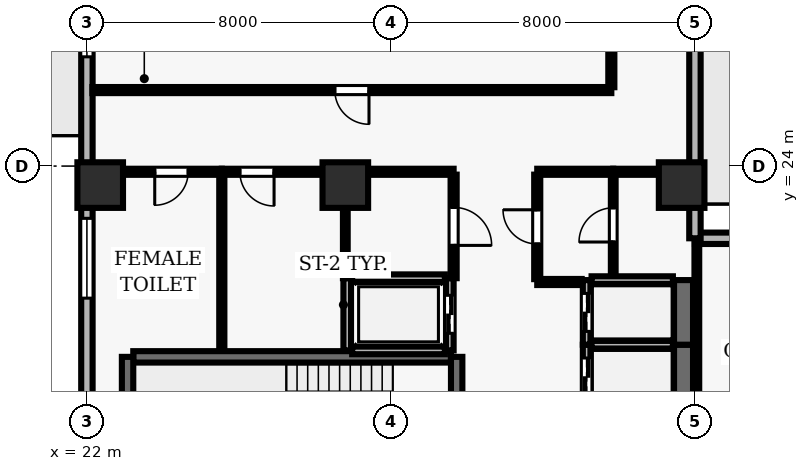
"""IFC4 building model, lengths in metres.
Left out: names, types, materials, properties, quantities, classifications, styles, units other than length and angle.
Written with IfcOpenShell. Run it as: python <this file> out.ifc"""

import sys

from ifc_helpers import new_model, si_unit, direction, frame, frame_2d, origin, origin_2d, place, context, subcontext, project, spatial, rectangle, extrude, element, fill, save


model = new_model("IFC4")
c1 = context("Model", 3, precision=1e-05, world=origin(), true_north=direction((0.0, 1.0)))
c2 = subcontext(c1, "Body", "Model", "MODEL_VIEW")
j1 = project(units=[si_unit("LENGTHUNIT", "METRE"), si_unit("PLANEANGLEUNIT", "RADIAN")], contexts=[c1])
p1 = place(None, origin())
s1 = spatial("IfcSite", under=j1, at=p1, CompositionType="ELEMENT")
p2 = place(p1, origin())
s2 = spatial("IfcBuilding", under=s1, at=p2, CompositionType="ELEMENT")
p3 = place(p2, frame((0.0, 0.0, 161.9)))
s3 = spatial("IfcBuildingStorey", under=s2, at=p3, CompositionType="ELEMENT", Elevation=161.9)
for number, where, z_axis, x_axis in (
    (1, (22.35, 23.5, 0.0), (0.0, 0.0, 1.0), (1.0, 0.0, 0.0)),
    (2, (28.8, 23.5, 0.0), (0.0, 0.0, 1.0), (1.0, 0.0, 0.0)),
    (3, (37.65, 23.5, 0.0), (0.0, 0.0, 1.0), (1.0, 0.0, 0.0)),
):
    element("IfcColumn", number, at=place(p3, frame(where, z_axis=z_axis, x_axis=x_axis)), inside=s3, PredefinedType="COLUMN", context=c2, shape_type="SweptSolid", body=[
        extrude(rectangle(XDim=1.2, YDim=1.2, at=origin_2d()), origin(), (0.0, 0.0, 1.0), 3.9),
    ])
p4 = place(p3, frame((43.541, 22.1, 0.0), z_axis=(0.0, 0.0, 1.0), x_axis=(-1.0, 0.0, 0.0)))
e4 = element("IfcWall", 4, at=p4, inside=s3, PredefinedType="SOLIDWALL", context=c2, shape_type="SweptSolid", body=[
    extrude(rectangle(XDim=5.541, YDim=0.3, at=frame_2d((2.771, 0.0))), origin(), (0.0, 0.0, 1.0), 3.64),
])
p5 = place(p4, frame((1.57, 0.0, 0.9)))
e5 = element("IfcOpeningElement", 5, at=p5, cuts=e4, PredefinedType="OPENING", context=c2, shape_type="SweptSolid", body=[
    extrude(rectangle(XDim=2.4, YDim=2.2, at=frame_2d((1.2, 1.1))), frame((0.0, 0.16, 0.0), z_axis=(0.0, -1.0, 0.0), x_axis=(1.0, 0.0, 0.0)), (0.0, 0.0, 1.0), 0.32),
])
p6 = place(p3, frame((38.0, 22.1, 0.0), z_axis=(0.0, 0.0, 1.0), x_axis=(0.0, 1.0, 0.0)))
e6 = element("IfcWall", 6, at=p6, inside=s3, PredefinedType="SOLIDWALL", context=c2, shape_type="SweptSolid", body=[
    extrude(rectangle(XDim=24.0, YDim=0.3, at=frame_2d((12.0, 0.0))), origin(), (0.0, 0.0, 1.0), 3.64),
])
p7 = place(p6, frame((10.5, 0.0, 0.0)))
e7 = element("IfcOpeningElement", 7, at=p7, cuts=e6, PredefinedType="OPENING", context=c2, shape_type="SweptSolid", body=[
    extrude(rectangle(XDim=1.0, YDim=2.2, at=frame_2d((0.5, 1.1))), frame((0.0, 0.16, 0.0), z_axis=(0.0, -1.0, 0.0), x_axis=(1.0, 0.0, 0.0)), (0.0, 0.0, 1.0), 0.32),
])
p8 = place(p6, frame((14.4, 0.0, 0.9)))
e8 = element("IfcOpeningElement", 8, at=p8, cuts=e6, PredefinedType="OPENING", context=c2, shape_type="SweptSolid", body=[
    extrude(rectangle(XDim=3.0, YDim=2.2, at=frame_2d((1.5, 1.1))), frame((0.0, 0.16, 0.0), z_axis=(0.0, -1.0, 0.0), x_axis=(1.0, 0.0, 0.0)), (0.0, 0.0, 1.0), 0.32),
])
p9 = place(p6, frame((19.95, 0.0, 0.9)))
e9 = element("IfcOpeningElement", 9, at=p9, cuts=e6, PredefinedType="OPENING", context=c2, shape_type="SweptSolid", body=[
    extrude(rectangle(XDim=3.0, YDim=2.2, at=frame_2d((1.5, 1.1))), frame((0.0, 0.16, 0.0), z_axis=(0.0, -1.0, 0.0), x_axis=(1.0, 0.0, 0.0)), (0.0, 0.0, 1.0), 0.32),
])
p10 = place(p3, frame((22.0, 46.1, 0.0), z_axis=(0.0, 0.0, 1.0), x_axis=(0.0, -1.0, 0.0)))
e10 = element("IfcWall", 10, at=p10, inside=s3, PredefinedType="SOLIDWALL", context=c2, shape_type="SweptSolid", body=[
    extrude(rectangle(XDim=43.6, YDim=0.3, at=frame_2d((21.8, 0.0))), origin(), (0.0, 0.0, 1.0), 3.64),
])
p11 = place(p10, frame((7.1, 0.0, 0.0)))
e11 = element("IfcOpeningElement", 11, at=p11, cuts=e10, PredefinedType="OPENING", context=c2, shape_type="SweptSolid", body=[
    extrude(rectangle(XDim=1.0, YDim=2.2, at=frame_2d((0.5, 1.1))), frame((0.0, 0.16, 0.0), z_axis=(0.0, -1.0, 0.0), x_axis=(1.0, 0.0, 0.0)), (0.0, 0.0, 1.0), 0.32),
])
p12 = place(p10, frame((1.675, 0.0, 0.9)))
e12 = element("IfcOpeningElement", 12, at=p12, cuts=e10, PredefinedType="OPENING", context=c2, shape_type="SweptSolid", body=[
    extrude(rectangle(XDim=2.1, YDim=1.6, at=frame_2d((1.05, 0.8))), frame((0.0, 0.16, 0.0), z_axis=(0.0, -1.0, 0.0), x_axis=(1.0, 0.0, 0.0)), (0.0, 0.0, 1.0), 0.32),
])
p13 = place(p10, frame((13.475, 0.0, 0.9)))
e13 = element("IfcOpeningElement", 13, at=p13, cuts=e10, PredefinedType="OPENING", context=c2, shape_type="SweptSolid", body=[
    extrude(rectangle(XDim=2.1, YDim=1.6, at=frame_2d((1.05, 0.8))), frame((0.0, 0.16, 0.0), z_axis=(0.0, -1.0, 0.0), x_axis=(1.0, 0.0, 0.0)), (0.0, 0.0, 1.0), 0.32),
])
p14 = place(p10, frame((17.125, 0.0, 0.9)))
e14 = element("IfcOpeningElement", 14, at=p14, cuts=e10, PredefinedType="OPENING", context=c2, shape_type="SweptSolid", body=[
    extrude(rectangle(XDim=2.1, YDim=1.6, at=frame_2d((1.05, 0.8))), frame((0.0, 0.16, 0.0), z_axis=(0.0, -1.0, 0.0), x_axis=(1.0, 0.0, 0.0)), (0.0, 0.0, 1.0), 0.32),
])
p15 = place(p10, frame((23.475, 0.0, 0.9)))
e15 = element("IfcOpeningElement", 15, at=p15, cuts=e10, PredefinedType="OPENING", context=c2, shape_type="SweptSolid", body=[
    extrude(rectangle(XDim=2.1, YDim=1.6, at=frame_2d((1.05, 0.8))), frame((0.0, 0.16, 0.0), z_axis=(0.0, -1.0, 0.0), x_axis=(1.0, 0.0, 0.0)), (0.0, 0.0, 1.0), 0.32),
])
p16 = place(p10, frame((28.475, 0.0, 0.9)))
e16 = element("IfcOpeningElement", 16, at=p16, cuts=e10, PredefinedType="OPENING", context=c2, shape_type="SweptSolid", body=[
    extrude(rectangle(XDim=2.1, YDim=1.6, at=frame_2d((1.05, 0.8))), frame((0.0, 0.16, 0.0), z_axis=(0.0, -1.0, 0.0), x_axis=(1.0, 0.0, 0.0)), (0.0, 0.0, 1.0), 0.32),
])
p17 = place(p10, frame((34.375, 0.0, 0.9)))
e17 = element("IfcOpeningElement", 17, at=p17, cuts=e10, PredefinedType="OPENING", context=c2, shape_type="SweptSolid", body=[
    extrude(rectangle(XDim=2.1, YDim=1.6, at=frame_2d((1.05, 0.8))), frame((0.0, 0.16, 0.0), z_axis=(0.0, -1.0, 0.0), x_axis=(1.0, 0.0, 0.0)), (0.0, 0.0, 1.0), 0.32),
])
p18 = place(p3, frame((31.58, 18.98, 0.0), z_axis=(0.0, 0.0, 1.0), x_axis=(-1.0, 0.0, 0.0)))
e18 = element("IfcWall", 18, at=p18, inside=s3, PredefinedType="SHEAR", context=c2, shape_type="SweptSolid", body=[
    extrude(rectangle(XDim=8.36, YDim=0.3, at=frame_2d((4.18, 0.0))), origin(), (0.0, 0.0, 1.0), 3.64),
])
p19 = place(p3, frame((23.07, 18.98, 0.0), z_axis=(0.0, 0.0, 1.0), x_axis=(0.0, -1.0, 0.0)))
e19 = element("IfcWall", 19, at=p19, inside=s3, PredefinedType="SHEAR", context=c2, shape_type="SweptSolid", body=[
    extrude(rectangle(XDim=3.51, YDim=0.3, at=frame_2d((1.755, 0.0))), origin(), (0.0, 0.0, 1.0), 3.64),
])
p20 = place(p3, frame((31.73, 15.47, 0.0), z_axis=(0.0, 0.0, 1.0), x_axis=(0.0, 1.0, 0.0)))
e20 = element("IfcWall", 20, at=p20, inside=s3, PredefinedType="SHEAR", context=c2, shape_type="SweptSolid", body=[
    extrude(rectangle(XDim=3.51, YDim=0.3, at=frame_2d((1.755, 0.0))), origin(), (0.0, 0.0, 1.0), 3.64),
])
p21 = place(p20, frame((1.18, 0.0, 0.0)))
e21 = element("IfcOpeningElement", 21, at=p21, cuts=e20, PredefinedType="OPENING", context=c2, shape_type="SweptSolid", body=[
    extrude(rectangle(XDim=1.15, YDim=2.15, at=frame_2d((0.575, 1.075))), frame((0.0, 0.16, 0.0), z_axis=(0.0, -1.0, 0.0), x_axis=(1.0, 0.0, 0.0)), (0.0, 0.0, 1.0), 0.32),
])
p22 = place(p3, frame((35.15, 19.3, 0.0), z_axis=(0.0, 0.0, 1.0), x_axis=(0.0, -1.0, 0.0)))
e22 = element("IfcWall", 22, at=p22, inside=s3, PredefinedType="SOLIDWALL", context=c2, shape_type="SweptSolid", body=[
    extrude(rectangle(XDim=1.7, YDim=0.2, at=frame_2d((0.85, 0.0))), origin(), (0.0, 0.0, 1.0), 3.64),
])
p23 = place(p22, frame((0.35, 0.0, 0.0)))
e23 = element("IfcOpeningElement", 23, at=p23, cuts=e22, PredefinedType="OPENING", context=c2, shape_type="SweptSolid", body=[
    extrude(rectangle(XDim=1.0, YDim=2.1, at=frame_2d((0.5, 1.05))), frame((0.0, 0.11, 0.0), z_axis=(0.0, -1.0, 0.0), x_axis=(1.0, 0.0, 0.0)), (0.0, 0.0, 1.0), 0.22),
])
p24 = place(p3, frame((37.7, 17.6, 0.0), z_axis=(0.0, 0.0, 1.0), x_axis=(0.0, 1.0, 0.0)))
e24 = element("IfcWall", 24, at=p24, inside=s3, PredefinedType="SHEAR", context=c2, shape_type="SweptSolid", body=[
    extrude(rectangle(XDim=1.7, YDim=0.5, at=frame_2d((0.85, 0.0))), origin(), (0.0, 0.0, 1.0), 3.64),
])
p25 = place(p3, frame((37.42, 19.3, 0.0), z_axis=(0.0, 0.0, 1.0), x_axis=(-1.0, 0.0, 0.0)))
e25 = element("IfcWall", 25, at=p25, inside=s3, PredefinedType="SOLIDWALL", context=c2, shape_type="SweptSolid", body=[
    extrude(rectangle(XDim=2.14, YDim=0.2, at=frame_2d((1.07, 0.0))), origin(), (0.0, 0.0, 1.0), 3.64),
])
p26 = place(p3, frame((35.15, 21.0, 0.0), z_axis=(0.0, 0.0, 1.0), x_axis=(0.0, -1.0, 0.0)))
e26 = element("IfcWall", 26, at=p26, inside=s3, PredefinedType="SOLIDWALL", context=c2, shape_type="SweptSolid", body=[
    extrude(rectangle(XDim=1.7, YDim=0.2, at=frame_2d((0.85, 0.0))), origin(), (0.0, 0.0, 1.0), 3.64),
])
p27 = place(p26, frame((0.35, 0.0, 0.0)))
e27 = element("IfcOpeningElement", 27, at=p27, cuts=e26, PredefinedType="OPENING", context=c2, shape_type="SweptSolid", body=[
    extrude(rectangle(XDim=1.0, YDim=2.1, at=frame_2d((0.5, 1.05))), frame((0.0, 0.11, 0.0), z_axis=(0.0, -1.0, 0.0), x_axis=(1.0, 0.0, 0.0)), (0.0, 0.0, 1.0), 0.22),
])
p28 = place(p3, frame((37.7, 19.3, 0.0), z_axis=(0.0, 0.0, 1.0), x_axis=(0.0, 1.0, 0.0)))
e28 = element("IfcWall", 28, at=p28, inside=s3, PredefinedType="SHEAR", context=c2, shape_type="SweptSolid", body=[
    extrude(rectangle(XDim=1.7, YDim=0.5, at=frame_2d((0.85, 0.0))), origin(), (0.0, 0.0, 1.0), 3.64),
])
p29 = place(p3, frame((37.42, 21.0, 0.0), z_axis=(0.0, 0.0, 1.0), x_axis=(-1.0, 0.0, 0.0)))
e29 = element("IfcWall", 29, at=p29, inside=s3, PredefinedType="SOLIDWALL", context=c2, shape_type="SweptSolid", body=[
    extrude(rectangle(XDim=2.14, YDim=0.2, at=frame_2d((1.07, 0.0))), origin(), (0.0, 0.0, 1.0), 3.64),
])
p30 = place(p3, frame((28.85, 21.05, 0.0), z_axis=(0.0, 0.0, 1.0), x_axis=(0.0, -1.0, 0.0)))
e30 = element("IfcWall", 30, at=p30, inside=s3, PredefinedType="SOLIDWALL", context=c2, shape_type="SweptSolid", body=[
    extrude(rectangle(XDim=1.9, YDim=0.2, at=frame_2d((0.95, 0.0))), origin(), (0.0, 0.0, 1.0), 3.64),
])
p31 = place(p3, frame((31.55, 19.15, 0.0), z_axis=(0.0, 0.0, 1.0), x_axis=(0.0, 1.0, 0.0)))
e31 = element("IfcWall", 31, at=p31, inside=s3, PredefinedType="SOLIDWALL", context=c2, shape_type="SweptSolid", body=[
    extrude(rectangle(XDim=1.9, YDim=0.2, at=frame_2d((0.95, 0.0))), origin(), (0.0, 0.0, 1.0), 3.64),
])
p32 = place(p31, frame((0.45, 0.0, 0.0)))
e32 = element("IfcOpeningElement", 32, at=p32, cuts=e31, PredefinedType="OPENING", context=c2, shape_type="SweptSolid", body=[
    extrude(rectangle(XDim=1.0, YDim=2.1, at=frame_2d((0.5, 1.05))), frame((0.0, 0.11, 0.0), z_axis=(0.0, -1.0, 0.0), x_axis=(1.0, 0.0, 0.0)), (0.0, 0.0, 1.0), 0.22),
])
for number, where, z_axis, x_axis in (
    (33, (28.98, 19.15, 0.0), (0.0, 0.0, 1.0), (1.0, 0.0, 0.0)),
    (34, (31.42, 21.05, 0.0), (0.0, 0.0, 1.0), (-1.0, 0.0, 0.0)),
):
    element("IfcWall", number, at=place(p3, frame(where, z_axis=z_axis, x_axis=x_axis)), inside=s3, PredefinedType="SOLIDWALL", context=c2, shape_type="SweptSolid", body=[
        extrude(rectangle(XDim=2.44, YDim=0.2, at=frame_2d((1.22, 0.0))), origin(), (0.0, 0.0, 1.0), 3.64),
    ])
p33 = place(p3, frame((25.55, 23.85, 0.0), z_axis=(0.0, 0.0, 1.0), x_axis=(-1.0, 0.0, 0.0)))
e35 = element("IfcWall", 35, at=p33, inside=s3, PredefinedType="PARTITIONING", context=c2, shape_type="SweptSolid", body=[
    extrude(rectangle(XDim=3.35, YDim=0.16, at=frame_2d((1.675, 0.0))), origin(), (0.0, 0.0, 1.0), 3.023),
])
p34 = place(p33, frame((0.885, 0.0, 0.0)))
e36 = element("IfcOpeningElement", 36, at=p34, cuts=e35, PredefinedType="OPENING", context=c2, shape_type="SweptSolid", body=[
    extrude(rectangle(XDim=0.88, YDim=2.1, at=frame_2d((0.44, 1.05))), frame((0.0, 0.09, 0.0), z_axis=(0.0, -1.0, 0.0), x_axis=(1.0, 0.0, 0.0)), (0.0, 0.0, 1.0), 0.18),
])
p35 = place(p3, frame((28.8, 23.85, 0.0), z_axis=(0.0, 0.0, 1.0), x_axis=(-1.0, 0.0, 0.0)))
e37 = element("IfcWall", 37, at=p35, inside=s3, PredefinedType="PARTITIONING", context=c2, shape_type="SweptSolid", body=[
    extrude(rectangle(XDim=3.25, YDim=0.16, at=frame_2d((1.625, 0.0))), origin(), (0.0, 0.0, 1.0), 3.023),
])
p36 = place(p35, frame((1.875, 0.0, 0.0)))
e38 = element("IfcOpeningElement", 38, at=p36, cuts=e37, PredefinedType="OPENING", context=c2, shape_type="SweptSolid", body=[
    extrude(rectangle(XDim=0.9, YDim=2.1, at=frame_2d((0.45, 1.05))), frame((0.0, 0.09, 0.0), z_axis=(0.0, -1.0, 0.0), x_axis=(1.0, 0.0, 0.0)), (0.0, 0.0, 1.0), 0.18),
])
p37 = place(p3, frame((31.65, 23.85, 0.0), z_axis=(0.0, 0.0, 1.0), x_axis=(-1.0, 0.0, 0.0)))
e39 = element("IfcWall", 39, at=p37, inside=s3, PredefinedType="PARTITIONING", context=c2, shape_type="SweptSolid", body=[
    extrude(rectangle(XDim=2.85, YDim=0.16, at=frame_2d((1.425, 0.0))), origin(), (0.0, 0.0, 1.0), 3.023),
])
p38 = place(p3, frame((35.02, 20.95, 0.0), z_axis=(0.0, 0.0, 1.0), x_axis=(-1.0, 0.0, 0.0)))
e40 = element("IfcWall", 40, at=p38, inside=s3, PredefinedType="PARTITIONING", context=c2, shape_type="SweptSolid", body=[
    extrude(rectangle(XDim=1.17, YDim=0.16, at=frame_2d((0.585, 0.0))), origin(), (0.0, 0.0, 1.0), 3.64),
])
p39 = place(p3, frame((35.8, 26.0, 0.0), z_axis=(0.0, 0.0, 1.0), x_axis=(-1.0, 0.0, 0.0)))
e41 = element("IfcWall", 41, at=p39, inside=s3, PredefinedType="PARTITIONING", context=c2, shape_type="SweptSolid", body=[
    extrude(rectangle(XDim=13.655, YDim=0.16, at=frame_2d((6.828, 0.0))), origin(), (0.0, 0.0, 1.0), 3.64),
])
p40 = place(p39, frame((6.377, 0.0, 0.0)))
e42 = element("IfcOpeningElement", 42, at=p40, cuts=e41, PredefinedType="OPENING", context=c2, shape_type="SweptSolid", body=[
    extrude(rectangle(XDim=0.9, YDim=2.1, at=frame_2d((0.45, 1.05))), frame((0.0, 0.09, 0.0), z_axis=(0.0, -1.0, 0.0), x_axis=(1.0, 0.0, 0.0)), (0.0, 0.0, 1.0), 0.18),
])
for number, where, z_axis, x_axis in (
    (43, (35.85, 23.85, 0.0), (0.0, 0.0, 1.0), (-1.0, 0.0, 0.0)),
    (44, (37.85, 23.85, 0.0), (0.0, 0.0, 1.0), (-1.0, 0.0, 0.0)),
):
    element("IfcWall", number, at=place(p3, frame(where, z_axis=z_axis, x_axis=x_axis)), inside=s3, PredefinedType="PARTITIONING", context=c2, shape_type="SweptSolid", body=[
        extrude(rectangle(XDim=2.0, YDim=0.16, at=frame_2d((1.0, 0.0))), origin(), (0.0, 0.0, 1.0), 3.023),
    ])
p41 = place(p3, frame((25.55, 19.16, 0.0), z_axis=(0.0, 0.0, 1.0), x_axis=(0.0, 1.0, 0.0)))
e45 = element("IfcWall", 45, at=p41, inside=s3, PredefinedType="PARTITIONING", context=c2, shape_type="SweptSolid", body=[
    extrude(rectangle(XDim=4.615, YDim=0.135, at=frame_2d((2.308, 0.0))), origin(), (0.0, 0.0, 1.0), 3.64),
])
p42 = place(p3, frame((28.8, 23.775, 0.0), z_axis=(0.0, 0.0, 1.0), x_axis=(0.0, -1.0, 0.0)))
e46 = element("IfcWall", 46, at=p42, inside=s3, PredefinedType="PARTITIONING", context=c2, shape_type="SweptSolid", body=[
    extrude(rectangle(XDim=2.725, YDim=0.125, at=frame_2d((1.362, 0.0))), origin(), (0.0, 0.0, 1.0), 3.64),
])
p43 = place(p3, frame((31.65, 23.775, 0.0), z_axis=(0.0, 0.0, 1.0), x_axis=(0.0, -1.0, 0.0)))
e47 = element("IfcWall", 47, at=p43, inside=s3, PredefinedType="PARTITIONING", context=c2, shape_type="SweptSolid", body=[
    extrude(rectangle(XDim=2.725, YDim=0.16, at=frame_2d((1.362, 0.0))), origin(), (0.0, 0.0, 1.0), 3.64),
])
p44 = place(p43, frame((0.862, 0.0, 0.0)))
e48 = element("IfcOpeningElement", 48, at=p44, cuts=e47, PredefinedType="OPENING", context=c2, shape_type="SweptSolid", body=[
    extrude(rectangle(XDim=1.0, YDim=2.1, at=frame_2d((0.5, 1.05))), frame((0.0, 0.09, 0.0), z_axis=(0.0, -1.0, 0.0), x_axis=(1.0, 0.0, 0.0)), (0.0, 0.0, 1.0), 0.18),
])
p45 = place(p3, frame((33.85, 21.025, 0.0), z_axis=(0.0, 0.0, 1.0), x_axis=(0.0, 1.0, 0.0)))
e49 = element("IfcWall", 49, at=p45, inside=s3, PredefinedType="PARTITIONING", context=c2, shape_type="SweptSolid", body=[
    extrude(rectangle(XDim=2.75, YDim=0.16, at=frame_2d((1.375, 0.0))), origin(), (0.0, 0.0, 1.0), 3.64),
])
p46 = place(p45, frame((0.925, 0.0, 0.0)))
e50 = element("IfcOpeningElement", 50, at=p46, cuts=e49, PredefinedType="OPENING", context=c2, shape_type="SweptSolid", body=[
    extrude(rectangle(XDim=0.9, YDim=2.1, at=frame_2d((0.45, 1.05))), frame((0.0, 0.09, 0.0), z_axis=(0.0, -1.0, 0.0), x_axis=(1.0, 0.0, 0.0)), (0.0, 0.0, 1.0), 0.18),
])
p47 = place(p3, frame((35.8, 33.403, 0.0), z_axis=(0.0, 0.0, 1.0), x_axis=(0.0, -1.0, 0.0)))
e51 = element("IfcWall", 51, at=p47, inside=s3, PredefinedType="PARTITIONING", context=c2, shape_type="SweptSolid", body=[
    extrude(rectangle(XDim=7.328, YDim=0.16, at=frame_2d((3.664, 0.0))), origin(), (0.0, 0.0, 1.0), 3.64),
])
p48 = place(p3, frame((35.85, 21.13, 0.0), z_axis=(0.0, 0.0, 1.0), x_axis=(0.0, 1.0, 0.0)))
e52 = element("IfcWall", 52, at=p48, inside=s3, PredefinedType="PARTITIONING", context=c2, shape_type="SweptSolid", body=[
    extrude(rectangle(XDim=2.645, YDim=0.125, at=frame_2d((1.323, 0.0))), origin(), (0.0, 0.0, 1.0), 3.64),
])
p49 = place(p48, frame((0.872, 0.0, 0.0)))
e53 = element("IfcOpeningElement", 53, at=p49, cuts=e52, PredefinedType="OPENING", context=c2, shape_type="SweptSolid", body=[
    extrude(rectangle(XDim=0.9, YDim=2.1, at=frame_2d((0.45, 1.05))), frame((0.0, 0.073, 0.0), z_axis=(0.0, -1.0, 0.0), x_axis=(1.0, 0.0, 0.0)), (0.0, 0.0, 1.0), 0.145),
])
p50 = place(p3, frame((38.05, 21.955, 0.0), z_axis=(0.0, 0.0, 1.0), x_axis=(0.0, -1.0, 0.0)))
e54 = element("IfcWall", 54, at=p50, inside=s3, PredefinedType="PARTITIONING", context=c2, shape_type="SweptSolid", body=[
    extrude(rectangle(XDim=5.88, YDim=0.125, at=frame_2d((2.94, 0.0))), origin(), (0.0, 0.0, 1.0), 3.023),
])
p51 = place(p14, origin())
e55 = element("IfcWindow", 55, at=p51, inside=s3, PartitioningType="SINGLE_PANEL", PredefinedType="WINDOW", context=c2, shape_type="SweptSolid", body=[
    extrude(rectangle(XDim=2.1, YDim=1.6, at=frame_2d((1.05, 0.8))), frame((0.0, 0.03, 0.0), z_axis=(0.0, -1.0, 0.0), x_axis=(1.0, 0.0, 0.0)), (0.0, 0.0, 1.0), 0.06),
])
fill(e14, e55)
p52 = place(p15, origin())
e56 = element("IfcWindow", 56, at=p52, inside=s3, PartitioningType="SINGLE_PANEL", PredefinedType="WINDOW", context=c2, shape_type="SweptSolid", body=[
    extrude(rectangle(XDim=2.1, YDim=1.6, at=frame_2d((1.05, 0.8))), frame((0.0, 0.03, 0.0), z_axis=(0.0, -1.0, 0.0), x_axis=(1.0, 0.0, 0.0)), (0.0, 0.0, 1.0), 0.06),
])
fill(e15, e56)
p53 = place(p23, origin())
e57 = element("IfcDoor", 57, at=p53, inside=s3, OperationType="DOUBLE_DOOR_SLIDING", PredefinedType="DOOR", context=c2, shape_type="SweptSolid", body=[
    extrude(rectangle(XDim=1.0, YDim=2.1, at=frame_2d((0.5, 1.05))), frame((0.0, 0.025, 0.0), z_axis=(0.0, -1.0, 0.0), x_axis=(1.0, 0.0, 0.0)), (0.0, 0.0, 1.0), 0.05),
])
fill(e23, e57)
p54 = place(p27, origin())
e58 = element("IfcDoor", 58, at=p54, inside=s3, OperationType="DOUBLE_DOOR_SLIDING", PredefinedType="DOOR", context=c2, shape_type="SweptSolid", body=[
    extrude(rectangle(XDim=1.0, YDim=2.1, at=frame_2d((0.5, 1.05))), frame((0.0, 0.025, 0.0), z_axis=(0.0, -1.0, 0.0), x_axis=(1.0, 0.0, 0.0)), (0.0, 0.0, 1.0), 0.05),
])
fill(e27, e58)
p55 = place(p32, origin())
e59 = element("IfcDoor", 59, at=p55, inside=s3, OperationType="DOUBLE_DOOR_SLIDING", PredefinedType="DOOR", context=c2, shape_type="SweptSolid", body=[
    extrude(rectangle(XDim=1.0, YDim=2.1, at=frame_2d((0.5, 1.05))), frame((0.0, 0.025, 0.0), z_axis=(0.0, -1.0, 0.0), x_axis=(1.0, 0.0, 0.0)), (0.0, 0.0, 1.0), 0.05),
])
fill(e32, e59)
p56 = place(p46, origin())
e60 = element("IfcDoor", 60, at=p56, inside=s3, OperationType="SINGLE_SWING_RIGHT", PredefinedType="DOOR", context=c2, shape_type="SweptSolid", body=[
    extrude(rectangle(XDim=0.9, YDim=2.1, at=frame_2d((0.45, 1.05))), frame((0.0, 0.025, 0.0), z_axis=(0.0, -1.0, 0.0), x_axis=(1.0, 0.0, 0.0)), (0.0, 0.0, 1.0), 0.05),
])
fill(e50, e60)
p57 = place(p49, origin())
e61 = element("IfcDoor", 61, at=p57, inside=s3, OperationType="SINGLE_SWING_LEFT", PredefinedType="DOOR", context=c2, shape_type="SweptSolid", body=[
    extrude(rectangle(XDim=0.9, YDim=2.1, at=frame_2d((0.45, 1.05))), frame((0.0, 0.025, 0.0), z_axis=(0.0, -1.0, 0.0), x_axis=(1.0, 0.0, 0.0)), (0.0, 0.0, 1.0), 0.05),
])
fill(e53, e61)
p58 = place(p44, origin())
e62 = element("IfcDoor", 62, at=p58, inside=s3, OperationType="SINGLE_SWING_RIGHT", PredefinedType="DOOR", context=c2, shape_type="SweptSolid", body=[
    extrude(rectangle(XDim=1.0, YDim=2.1, at=frame_2d((0.5, 1.05))), frame((0.0, 0.025, 0.0), z_axis=(0.0, -1.0, 0.0), x_axis=(1.0, 0.0, 0.0)), (0.0, 0.0, 1.0), 0.05),
])
fill(e48, e62)
p59 = place(p34, origin())
e63 = element("IfcDoor", 63, at=p59, inside=s3, OperationType="SINGLE_SWING_RIGHT", PredefinedType="DOOR", context=c2, shape_type="SweptSolid", body=[
    extrude(rectangle(XDim=0.88, YDim=2.1, at=frame_2d((0.44, 1.05))), frame((0.0, 0.025, 0.0), z_axis=(0.0, -1.0, 0.0), x_axis=(1.0, 0.0, 0.0)), (0.0, 0.0, 1.0), 0.05),
])
fill(e36, e63)
p60 = place(p36, origin())
e64 = element("IfcDoor", 64, at=p60, inside=s3, OperationType="SINGLE_SWING_LEFT", PredefinedType="DOOR", context=c2, shape_type="SweptSolid", body=[
    extrude(rectangle(XDim=0.9, YDim=2.1, at=frame_2d((0.45, 1.05))), frame((0.0, 0.025, 0.0), z_axis=(0.0, -1.0, 0.0), x_axis=(1.0, 0.0, 0.0)), (0.0, 0.0, 1.0), 0.05),
])
fill(e38, e64)
p61 = place(p40, origin())
e65 = element("IfcDoor", 65, at=p61, inside=s3, OperationType="SINGLE_SWING_LEFT", PredefinedType="DOOR", context=c2, shape_type="SweptSolid", body=[
    extrude(rectangle(XDim=0.9, YDim=2.1, at=frame_2d((0.45, 1.05))), frame((0.0, 0.025, 0.0), z_axis=(0.0, -1.0, 0.0), x_axis=(1.0, 0.0, 0.0)), (0.0, 0.0, 1.0), 0.05),
])
fill(e42, e65)
save(model, sys.argv[1])
